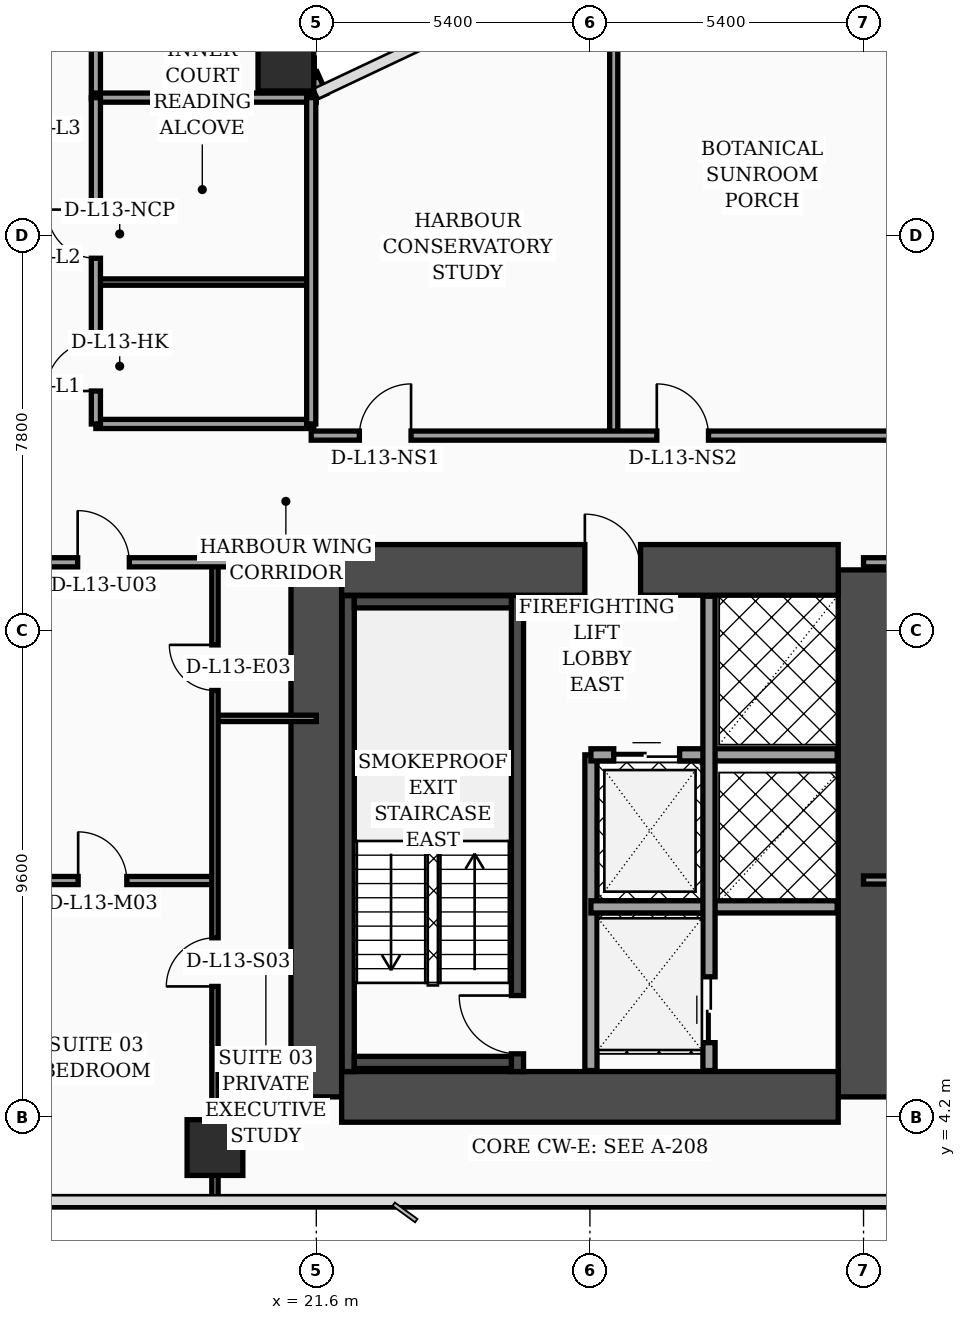
"""IFC4 building model, lengths in metres.
Left out: names, types, materials, properties, quantities, classifications, styles, units other than length and angle.
Written with IfcOpenShell. Run it as: python <this file> out.ifc"""

import sys

from ifc_helpers import new_model, si_unit, direction, frame, frame_2d, origin, origin_2d, place, context, subcontext, project, spatial, rectangle, hollow_rectangle, extrude, element, fill, save


model = new_model("IFC4")
c1 = context("Model", 3, precision=1e-05, world=origin(), true_north=direction((0.0, 1.0)))
c2 = subcontext(c1, "Body", "Model", "MODEL_VIEW")
j1 = project(units=[si_unit("LENGTHUNIT", "METRE"), si_unit("PLANEANGLEUNIT", "RADIAN")], contexts=[c1])
p1 = place(None, origin())
s1 = spatial("IfcSite", under=j1, at=p1, CompositionType="ELEMENT")
p2 = place(p1, origin())
s2 = spatial("IfcBuilding", under=s1, at=p2, CompositionType="ELEMENT")
p3 = place(p2, frame((0.0, 0.0, 58.4)))
s3 = spatial("IfcBuildingStorey", under=s2, at=p3, CompositionType="ELEMENT", Elevation=58.4)
for number, where, z_axis, x_axis in (
    (1, (21.6, 4.6, 0.0), (0.0, 0.0, 1.0), (0.0, 1.0, 0.0)),
    (2, (32.4, 4.6, 0.0), (0.0, 0.0, 1.0), (0.0, 1.0, 0.0)),
):
    element("IfcWall", number, at=place(p3, frame(where, z_axis=z_axis, x_axis=x_axis)), inside=s3, PredefinedType="SHEAR", context=c2, shape_type="SweptSolid", body=[
        extrude(rectangle(XDim=10.4, YDim=1.0, at=frame_2d((5.2, 0.0))), origin(), (0.0, 0.0, 1.0), 3.56),
    ])
p4 = place(p3, frame((22.1, 15.0, 0.0), z_axis=(0.0, 0.0, 1.0), x_axis=(1.0, 0.0, 0.0)))
e3 = element("IfcWall", 3, at=p4, inside=s3, PredefinedType="SHEAR", context=c2, shape_type="SweptSolid", body=[
    extrude(rectangle(XDim=9.8, YDim=1.0, at=frame_2d((4.9, 0.0))), origin(), (0.0, 0.0, 1.0), 3.56),
])
p5 = place(p4, frame((4.8, 0.0, 0.0)))
e4 = element("IfcOpeningElement", 4, at=p5, cuts=e3, PredefinedType="OPENING", context=c2, shape_type="SweptSolid", body=[
    extrude(rectangle(XDim=1.1, YDim=2.2, at=frame_2d((0.55, 1.1))), frame((0.0, 0.51, 0.0), z_axis=(0.0, -1.0, 0.0), x_axis=(1.0, 0.0, 0.0)), (0.0, 0.0, 1.0), 1.02),
])
p6 = place(p3, frame((22.1, 4.6, 0.0), z_axis=(0.0, 0.0, 1.0), x_axis=(1.0, 0.0, 0.0)))
e5 = element("IfcWall", 5, at=p6, inside=s3, PredefinedType="SHEAR", context=c2, shape_type="SweptSolid", body=[
    extrude(rectangle(XDim=9.8, YDim=1.0, at=frame_2d((4.9, 0.0))), origin(), (0.0, 0.0, 1.0), 3.56),
])
p7 = place(p3, frame((22.23, 5.1, 0.0), z_axis=(0.0, 0.0, 1.0), x_axis=(0.0, 1.0, 0.0)))
e6 = element("IfcWall", 6, at=p7, inside=s3, PredefinedType="SOLIDWALL", context=c2, shape_type="SweptSolid", body=[
    extrude(rectangle(XDim=9.39, YDim=0.24, at=frame_2d((4.695, 0.0))), origin(), (0.0, 0.0, 1.0), 3.56),
])
p8 = place(p3, frame((25.57, 5.1, 0.0), z_axis=(0.0, 0.0, 1.0), x_axis=(0.0, 1.0, 0.0)))
e7 = element("IfcWall", 7, at=p8, inside=s3, PredefinedType="SOLIDWALL", context=c2, shape_type="SweptSolid", body=[
    extrude(rectangle(XDim=9.39, YDim=0.24, at=frame_2d((4.695, 0.0))), origin(), (0.0, 0.0, 1.0), 3.56),
])
p9 = place(p8, frame((0.35, 0.0, 0.0)))
e8 = element("IfcOpeningElement", 8, at=p9, cuts=e7, PredefinedType="OPENING", context=c2, shape_type="SweptSolid", body=[
    extrude(rectangle(XDim=1.15, YDim=2.2, at=frame_2d((0.575, 1.1))), frame((0.0, 0.13, 0.0), z_axis=(0.0, -1.0, 0.0), x_axis=(1.0, 0.0, 0.0)), (0.0, 0.0, 1.0), 0.26),
])
for number, where, z_axis, x_axis in (
    (9, (22.35, 5.28, 0.0), (0.0, 0.0, 1.0), (1.0, 0.0, 0.0)),
    (10, (22.35, 14.37, 0.0), (0.0, 0.0, 1.0), (1.0, 0.0, 0.0)),
):
    element("IfcWall", number, at=place(p3, frame(where, z_axis=z_axis, x_axis=x_axis)), inside=s3, PredefinedType="SOLIDWALL", context=c2, shape_type="SweptSolid", body=[
        extrude(rectangle(XDim=3.1, YDim=0.24, at=frame_2d((1.55, 0.0))), origin(), (0.0, 0.0, 1.0), 3.56),
    ])
for number, where, z_axis, x_axis in (
    (11, (21.0, 25.0, 0.0), (0.0, 0.0, 1.0), (1.0, 0.0, 0.0)),
    (12, (19.6, 3.6, 0.0), (0.0, 0.0, 1.0), (1.0, 0.0, 0.0)),
):
    element("IfcColumn", number, at=place(p3, frame(where, z_axis=z_axis, x_axis=x_axis)), inside=s3, PredefinedType="COLUMN", context=c2, shape_type="SweptSolid", body=[
        extrude(hollow_rectangle(XDim=1.1, YDim=1.1, WallThickness=0.045, at=origin_2d()), origin(), (0.0, 0.0, 1.0), 3.56),
    ])
p10 = place(p3, frame((21.68, 24.34, 0.0), z_axis=(0.0, 0.0, 1.0), x_axis=(-0.40758134973, 0.913168901875, 0.0)))
e13 = element("IfcWall", 13, at=p10, inside=s3, PredefinedType="SOLIDWALL", context=c2, shape_type="SweptSolid", body=[
    extrude(rectangle(XDim=0.471, YDim=0.28, at=frame_2d((0.235, 0.0))), origin(), (0.0, 0.0, 1.0), 3.56),
])
p11 = place(p3, frame((27.02, 5.12, 0.0), z_axis=(0.0, 0.0, 1.0), x_axis=(0.0, 1.0, 0.0)))
e14 = element("IfcWall", 14, at=p11, inside=s3, PredefinedType="SOLIDWALL", context=c2, shape_type="SweptSolid", body=[
    extrude(rectangle(XDim=6.23, YDim=0.24, at=frame_2d((3.115, 0.0))), origin(), (0.0, 0.0, 1.0), 3.56),
])
p12 = place(p3, frame((27.02, 11.35, 0.0), z_axis=(0.0, 0.0, 1.0), x_axis=(1.0, 0.0, 0.0)))
e15 = element("IfcWall", 15, at=p12, inside=s3, PredefinedType="SOLIDWALL", context=c2, shape_type="SweptSolid", body=[
    extrude(rectangle(XDim=4.86, YDim=0.24, at=frame_2d((2.43, 0.0))), origin(), (0.0, 0.0, 1.0), 3.56),
])
p13 = place(p12, frame((0.45, 0.0, 0.0)))
e16 = element("IfcOpeningElement", 16, at=p13, cuts=e15, PredefinedType="OPENING", context=c2, shape_type="SweptSolid", body=[
    extrude(rectangle(XDim=1.3, YDim=2.35, at=frame_2d((0.65, 1.175))), frame((0.0, 0.13, 0.0), z_axis=(0.0, -1.0, 0.0), x_axis=(1.0, 0.0, 0.0)), (0.0, 0.0, 1.0), 0.26),
])
p14 = place(p3, frame((27.02, 8.35, 0.0), z_axis=(0.0, 0.0, 1.0), x_axis=(1.0, 0.0, 0.0)))
e17 = element("IfcWall", 17, at=p14, inside=s3, PredefinedType="SOLIDWALL", context=c2, shape_type="SweptSolid", body=[
    extrude(rectangle(XDim=4.86, YDim=0.24, at=frame_2d((2.43, 0.0))), origin(), (0.0, 0.0, 1.0), 3.56),
])
p15 = place(p3, frame((29.35, 5.12, 0.0), z_axis=(0.0, 0.0, 1.0), x_axis=(0.0, 1.0, 0.0)))
e18 = element("IfcWall", 18, at=p15, inside=s3, PredefinedType="SOLIDWALL", context=c2, shape_type="SweptSolid", body=[
    extrude(rectangle(XDim=9.36, YDim=0.24, at=frame_2d((4.68, 0.0))), origin(), (0.0, 0.0, 1.0), 3.56),
])
p16 = place(p15, frame((0.55, 0.0, 0.0)))
e19 = element("IfcOpeningElement", 19, at=p16, cuts=e18, PredefinedType="OPENING", context=c2, shape_type="SweptSolid", body=[
    extrude(rectangle(XDim=1.3, YDim=2.35, at=frame_2d((0.65, 1.175))), frame((0.0, 0.13, 0.0), z_axis=(0.0, -1.0, 0.0), x_axis=(1.0, 0.0, 0.0)), (0.0, 0.0, 1.0), 0.26),
])
p17 = place(p3, frame((19.6, 12.07, 0.0), z_axis=(0.0, 0.0, 1.0), x_axis=(1.0, 0.0, 0.0)))
e20 = element("IfcWall", 20, at=p17, inside=s3, PredefinedType="PARTITIONING", context=c2, shape_type="SweptSolid", body=[
    extrude(rectangle(XDim=2.0, YDim=0.125, at=frame_2d((1.0, 0.0))), origin(), (0.0, 0.0, 1.0), 3.56),
])
p18 = place(p3, frame((15.15, 8.87, 0.0), z_axis=(0.0, 0.0, 1.0), x_axis=(1.0, 0.0, 0.0)))
e21 = element("IfcWall", 21, at=p18, inside=s3, PredefinedType="PARTITIONING", context=c2, shape_type="SweptSolid", body=[
    extrude(rectangle(XDim=4.45, YDim=0.16, at=frame_2d((2.225, 0.0))), origin(), (0.0, 0.0, 1.0), 3.56),
])
p19 = place(p18, frame((1.75, 0.0, 0.0)))
e22 = element("IfcOpeningElement", 22, at=p19, cuts=e21, PredefinedType="OPENING", context=c2, shape_type="SweptSolid", body=[
    extrude(rectangle(XDim=0.96, YDim=2.2, at=frame_2d((0.48, 1.1))), frame((0.0, 0.09, 0.0), z_axis=(0.0, -1.0, 0.0), x_axis=(1.0, 0.0, 0.0)), (0.0, 0.0, 1.0), 0.18),
])
p20 = place(p3, frame((19.6, 2.44, 0.0), z_axis=(0.0, 0.0, 1.0), x_axis=(0.0, 1.0, 0.0)))
e23 = element("IfcWall", 23, at=p20, inside=s3, PredefinedType="PARTITIONING", context=c2, shape_type="SweptSolid", body=[
    extrude(rectangle(XDim=12.71, YDim=0.125, at=frame_2d((6.355, 0.0))), origin(), (0.0, 0.0, 1.0), 2.34),
])
p21 = place(p20, frame((4.34, 0.0, 0.0)))
e24 = element("IfcOpeningElement", 24, at=p21, cuts=e23, PredefinedType="OPENING", context=c2, shape_type="SweptSolid", body=[
    extrude(rectangle(XDim=0.96, YDim=2.2, at=frame_2d((0.48, 1.1))), frame((0.0, 0.073, 0.0), z_axis=(0.0, -1.0, 0.0), x_axis=(1.0, 0.0, 0.0)), (0.0, 0.0, 1.0), 0.145),
])
p22 = place(p20, frame((10.18, 0.0, 0.0)))
e25 = element("IfcOpeningElement", 25, at=p22, cuts=e23, PredefinedType="OPENING", context=c2, shape_type="SweptSolid", body=[
    extrude(rectangle(XDim=0.9, YDim=2.15, at=frame_2d((0.45, 1.075))), frame((0.0, 0.073, 0.0), z_axis=(0.0, -1.0, 0.0), x_axis=(1.0, 0.0, 0.0)), (0.0, 0.0, 1.0), 0.145),
])
p23 = place(p3, frame((15.15, 15.15, 0.0), z_axis=(0.0, 0.0, 1.0), x_axis=(1.0, 0.0, 0.0)))
e26 = element("IfcWall", 26, at=p23, inside=s3, PredefinedType="PARTITIONING", context=c2, shape_type="SweptSolid", body=[
    extrude(rectangle(XDim=6.45, YDim=0.18, at=frame_2d((3.225, 0.0))), origin(), (0.0, 0.0, 1.0), 2.34),
])
p24 = place(p23, frame((1.74, 0.0, 0.0)))
e27 = element("IfcOpeningElement", 27, at=p24, cuts=e26, PredefinedType="OPENING", context=c2, shape_type="SweptSolid", body=[
    extrude(rectangle(XDim=1.02, YDim=2.2, at=frame_2d((0.51, 1.1))), frame((0.0, 0.1, 0.0), z_axis=(0.0, -1.0, 0.0), x_axis=(1.0, 0.0, 0.0)), (0.0, 0.0, 1.0), 0.2),
])
p25 = place(p3, frame((17.25, 24.3, 0.0), z_axis=(0.0, 0.0, 1.0), x_axis=(0.0, 1.0, 0.0)))
e28 = element("IfcWall", 28, at=p25, inside=s3, PredefinedType="PARTITIONING", context=c2, shape_type="SweptSolid", body=[
    extrude(rectangle(XDim=16.4, YDim=0.18, at=frame_2d((8.2, 0.0))), origin(), (0.0, 0.0, 1.0), 2.84),
])
p26 = place(p3, frame((17.25, 17.88, 0.0), z_axis=(0.0, 0.0, 1.0), x_axis=(1.0, 0.0, 0.0)))
e29 = element("IfcWall", 29, at=p26, inside=s3, PredefinedType="PARTITIONING", context=c2, shape_type="SweptSolid", body=[
    extrude(rectangle(XDim=4.3, YDim=0.18, at=frame_2d((2.15, 0.0))), origin(), (0.0, 0.0, 1.0), 3.09),
])
p27 = place(p3, frame((17.25, 20.68, 0.0), z_axis=(0.0, 0.0, 1.0), x_axis=(1.0, 0.0, 0.0)))
e30 = element("IfcWall", 30, at=p27, inside=s3, PredefinedType="PARTITIONING", context=c2, shape_type="SweptSolid", body=[
    extrude(rectangle(XDim=4.3, YDim=0.125, at=frame_2d((2.15, 0.0))), origin(), (0.0, 0.0, 1.0), 3.56),
])
p28 = place(p3, frame((17.25, 24.32, 0.0), z_axis=(0.0, 0.0, 1.0), x_axis=(1.0, 0.0, 0.0)))
e31 = element("IfcWall", 31, at=p28, inside=s3, PredefinedType="PARTITIONING", context=c2, shape_type="SweptSolid", body=[
    extrude(rectangle(XDim=4.35, YDim=0.18, at=frame_2d((2.175, 0.0))), origin(), (0.0, 0.0, 1.0), 3.56),
])
p29 = place(p3, frame((21.5, 17.88, 0.0), z_axis=(0.0, 0.0, 1.0), x_axis=(0.0, 1.0, 0.0)))
e32 = element("IfcWall", 32, at=p29, inside=s3, PredefinedType="PARTITIONING", context=c2, shape_type="SweptSolid", body=[
    extrude(rectangle(XDim=6.44, YDim=0.18, at=frame_2d((3.22, 0.0))), origin(), (0.0, 0.0, 1.0), 3.09),
])
p30 = place(p3, frame((17.25, 17.88, 0.0), z_axis=(0.0, 0.0, 1.0), x_axis=(0.0, 1.0, 0.0)))
e33 = element("IfcWall", 33, at=p30, inside=s3, PredefinedType="PARTITIONING", context=c2, shape_type="SweptSolid", body=[
    extrude(rectangle(XDim=6.44, YDim=0.18, at=frame_2d((3.22, 0.0))), origin(), (0.0, 0.0, 1.0), 3.09),
])
p31 = place(p30, frame((0.65, 0.0, 0.0)))
e34 = element("IfcOpeningElement", 34, at=p31, cuts=e33, PredefinedType="OPENING", context=c2, shape_type="SweptSolid", body=[
    extrude(rectangle(XDim=0.98, YDim=2.15, at=frame_2d((0.49, 1.075))), frame((0.0, 0.1, 0.0), z_axis=(0.0, -1.0, 0.0), x_axis=(1.0, 0.0, 0.0)), (0.0, 0.0, 1.0), 0.2),
])
p32 = place(p30, frame((3.27, 0.0, 0.0)))
e35 = element("IfcOpeningElement", 35, at=p32, cuts=e33, PredefinedType="OPENING", context=c2, shape_type="SweptSolid", body=[
    extrude(rectangle(XDim=0.96, YDim=2.2, at=frame_2d((0.48, 1.1))), frame((0.0, 0.1, 0.0), z_axis=(0.0, -1.0, 0.0), x_axis=(1.0, 0.0, 0.0)), (0.0, 0.0, 1.0), 0.2),
])
p33 = place(p3, frame((32.4, 8.88, 0.0), z_axis=(0.0, 0.0, 1.0), x_axis=(1.0, 0.0, 0.0)))
e36 = element("IfcWall", 36, at=p33, inside=s3, PredefinedType="PARTITIONING", context=c2, shape_type="SweptSolid", body=[
    extrude(rectangle(XDim=7.02, YDim=0.16, at=frame_2d((3.51, 0.0))), origin(), (0.0, 0.0, 1.0), 2.84),
])
p34 = place(p33, frame((3.03, 0.0, 0.0)))
e37 = element("IfcOpeningElement", 37, at=p34, cuts=e36, PredefinedType="OPENING", context=c2, shape_type="SweptSolid", body=[
    extrude(rectangle(XDim=0.96, YDim=2.2, at=frame_2d((0.48, 1.1))), frame((0.0, 0.09, 0.0), z_axis=(0.0, -1.0, 0.0), x_axis=(1.0, 0.0, 0.0)), (0.0, 0.0, 1.0), 0.18),
])
p35 = place(p3, frame((32.4, 15.15, 0.0), z_axis=(0.0, 0.0, 1.0), x_axis=(1.0, 0.0, 0.0)))
e38 = element("IfcWall", 38, at=p35, inside=s3, PredefinedType="PARTITIONING", context=c2, shape_type="SweptSolid", body=[
    extrude(rectangle(XDim=9.15, YDim=0.18, at=frame_2d((4.575, 0.0))), origin(), (0.0, 0.0, 1.0), 2.84),
])
p36 = place(p35, frame((3.1, 0.0, 0.0)))
e39 = element("IfcOpeningElement", 39, at=p36, cuts=e38, PredefinedType="OPENING", context=c2, shape_type="SweptSolid", body=[
    extrude(rectangle(XDim=1.02, YDim=2.2, at=frame_2d((0.51, 1.1))), frame((0.0, 0.1, 0.0), z_axis=(0.0, -1.0, 0.0), x_axis=(1.0, 0.0, 0.0)), (0.0, 0.0, 1.0), 0.2),
])
p37 = place(p3, frame((27.47, 17.65, 0.0), z_axis=(0.0, 0.0, 1.0), x_axis=(0.0, 1.0, 0.0)))
e40 = element("IfcWall", 40, at=p37, inside=s3, PredefinedType="PARTITIONING", context=c2, shape_type="SweptSolid", body=[
    extrude(rectangle(XDim=9.6, YDim=0.16, at=frame_2d((4.8, 0.0))), origin(), (0.0, 0.0, 1.0), 2.84),
])
p38 = place(p3, frame((21.5, 17.65, 0.0), z_axis=(0.0, 0.0, 1.0), x_axis=(1.0, 0.0, 0.0)))
e41 = element("IfcWall", 41, at=p38, inside=s3, PredefinedType="PARTITIONING", context=c2, shape_type="SweptSolid", body=[
    extrude(rectangle(XDim=17.7, YDim=0.18, at=frame_2d((8.85, 0.0))), origin(), (0.0, 0.0, 1.0), 2.84),
])
p39 = place(p38, frame((0.95, 0.0, 0.0)))
e42 = element("IfcOpeningElement", 42, at=p39, cuts=e41, PredefinedType="OPENING", context=c2, shape_type="SweptSolid", body=[
    extrude(rectangle(XDim=1.02, YDim=2.2, at=frame_2d((0.51, 1.1))), frame((0.0, 0.1, 0.0), z_axis=(0.0, -1.0, 0.0), x_axis=(1.0, 0.0, 0.0)), (0.0, 0.0, 1.0), 0.2),
])
p40 = place(p38, frame((6.82, 0.0, 0.0)))
e43 = element("IfcOpeningElement", 43, at=p40, cuts=e41, PredefinedType="OPENING", context=c2, shape_type="SweptSolid", body=[
    extrude(rectangle(XDim=1.02, YDim=2.2, at=frame_2d((0.51, 1.1))), frame((0.0, 0.1, 0.0), z_axis=(0.0, -1.0, 0.0), x_axis=(1.0, 0.0, 0.0)), (0.0, 0.0, 1.0), 0.2),
])
p41 = place(p38, frame((12.68, 0.0, 0.0)))
e44 = element("IfcOpeningElement", 44, at=p41, cuts=e41, PredefinedType="OPENING", context=c2, shape_type="SweptSolid", body=[
    extrude(rectangle(XDim=1.02, YDim=2.2, at=frame_2d((0.51, 1.1))), frame((0.0, 0.1, 0.0), z_axis=(0.0, -1.0, 0.0), x_axis=(1.0, 0.0, 0.0)), (0.0, 0.0, 1.0), 0.2),
])
p42 = place(p13, origin())
e45 = element("IfcDoor", 45, at=p42, inside=s3, OperationType="DOUBLE_DOOR_SLIDING", PredefinedType="DOOR", context=c2, shape_type="SweptSolid", body=[
    extrude(rectangle(XDim=1.3, YDim=2.35, at=frame_2d((0.65, 1.175))), frame((0.0, 0.025, 0.0), z_axis=(0.0, -1.0, 0.0), x_axis=(1.0, 0.0, 0.0)), (0.0, 0.0, 1.0), 0.05),
])
fill(e16, e45)
p43 = place(p16, origin())
e46 = element("IfcDoor", 46, at=p43, inside=s3, OperationType="DOUBLE_DOOR_SLIDING", PredefinedType="DOOR", context=c2, shape_type="SweptSolid", body=[
    extrude(rectangle(XDim=1.3, YDim=2.35, at=frame_2d((0.65, 1.175))), frame((0.0, 0.025, 0.0), z_axis=(0.0, -1.0, 0.0), x_axis=(1.0, 0.0, 0.0)), (0.0, 0.0, 1.0), 0.05),
])
fill(e19, e46)
p44 = place(p19, origin())
e47 = element("IfcDoor", 47, at=p44, inside=s3, OperationType="SINGLE_SWING_LEFT", PredefinedType="DOOR", context=c2, shape_type="SweptSolid", body=[
    extrude(rectangle(XDim=0.96, YDim=2.2, at=frame_2d((0.48, 1.1))), frame((0.0, 0.025, 0.0), z_axis=(0.0, -1.0, 0.0), x_axis=(1.0, 0.0, 0.0)), (0.0, 0.0, 1.0), 0.05),
])
fill(e22, e47)
p45 = place(p21, origin())
e48 = element("IfcDoor", 48, at=p45, inside=s3, OperationType="SINGLE_SWING_LEFT", PredefinedType="DOOR", context=c2, shape_type="SweptSolid", body=[
    extrude(rectangle(XDim=0.96, YDim=2.2, at=frame_2d((0.48, 1.1))), frame((0.0, 0.025, 0.0), z_axis=(0.0, -1.0, 0.0), x_axis=(1.0, 0.0, 0.0)), (0.0, 0.0, 1.0), 0.05),
])
fill(e24, e48)
p46 = place(p22, origin())
e49 = element("IfcDoor", 49, at=p46, inside=s3, OperationType="SINGLE_SWING_RIGHT", PredefinedType="DOOR", context=c2, shape_type="SweptSolid", body=[
    extrude(rectangle(XDim=0.9, YDim=2.15, at=frame_2d((0.45, 1.075))), frame((0.0, 0.025, 0.0), z_axis=(0.0, -1.0, 0.0), x_axis=(1.0, 0.0, 0.0)), (0.0, 0.0, 1.0), 0.05),
])
fill(e25, e49)
p47 = place(p24, origin())
e50 = element("IfcDoor", 50, at=p47, inside=s3, OperationType="SINGLE_SWING_LEFT", PredefinedType="DOOR", context=c2, shape_type="SweptSolid", body=[
    extrude(rectangle(XDim=1.02, YDim=2.2, at=frame_2d((0.51, 1.1))), frame((0.0, 0.025, 0.0), z_axis=(0.0, -1.0, 0.0), x_axis=(1.0, 0.0, 0.0)), (0.0, 0.0, 1.0), 0.05),
])
fill(e27, e50)
p48 = place(p31, origin())
e51 = element("IfcDoor", 51, at=p48, inside=s3, OperationType="SINGLE_SWING_LEFT", PredefinedType="DOOR", context=c2, shape_type="SweptSolid", body=[
    extrude(rectangle(XDim=0.98, YDim=2.15, at=frame_2d((0.49, 1.075))), frame((0.0, 0.025, 0.0), z_axis=(0.0, -1.0, 0.0), x_axis=(1.0, 0.0, 0.0)), (0.0, 0.0, 1.0), 0.05),
])
fill(e34, e51)
p49 = place(p32, origin())
e52 = element("IfcDoor", 52, at=p49, inside=s3, OperationType="SINGLE_SWING_RIGHT", PredefinedType="DOOR", context=c2, shape_type="SweptSolid", body=[
    extrude(rectangle(XDim=0.96, YDim=2.2, at=frame_2d((0.48, 1.1))), frame((0.0, 0.025, 0.0), z_axis=(0.0, -1.0, 0.0), x_axis=(1.0, 0.0, 0.0)), (0.0, 0.0, 1.0), 0.05),
])
fill(e35, e52)
p50 = place(p39, origin())
e53 = element("IfcDoor", 53, at=p50, inside=s3, OperationType="SINGLE_SWING_RIGHT", PredefinedType="DOOR", context=c2, shape_type="SweptSolid", body=[
    extrude(rectangle(XDim=1.02, YDim=2.2, at=frame_2d((0.51, 1.1))), frame((0.0, 0.025, 0.0), z_axis=(0.0, -1.0, 0.0), x_axis=(1.0, 0.0, 0.0)), (0.0, 0.0, 1.0), 0.05),
])
fill(e42, e53)
p51 = place(p40, origin())
e54 = element("IfcDoor", 54, at=p51, inside=s3, OperationType="SINGLE_SWING_LEFT", PredefinedType="DOOR", context=c2, shape_type="SweptSolid", body=[
    extrude(rectangle(XDim=1.02, YDim=2.2, at=frame_2d((0.51, 1.1))), frame((0.0, 0.025, 0.0), z_axis=(0.0, -1.0, 0.0), x_axis=(1.0, 0.0, 0.0)), (0.0, 0.0, 1.0), 0.05),
])
fill(e43, e54)
p52 = place(p9, origin())
e55 = element("IfcDoor", 55, at=p52, inside=s3, OperationType="SINGLE_SWING_RIGHT", PredefinedType="DOOR", context=c2, shape_type="SweptSolid", body=[
    extrude(rectangle(XDim=1.15, YDim=2.2, at=frame_2d((0.575, 1.1))), frame((0.0, 0.025, 0.0), z_axis=(0.0, -1.0, 0.0), x_axis=(1.0, 0.0, 0.0)), (0.0, 0.0, 1.0), 0.05),
])
fill(e8, e55)
p53 = place(p5, origin())
e56 = element("IfcDoor", 56, at=p53, inside=s3, OperationType="SINGLE_SWING_LEFT", PredefinedType="DOOR", context=c2, shape_type="SweptSolid", body=[
    extrude(rectangle(XDim=1.1, YDim=2.2, at=frame_2d((0.55, 1.1))), frame((0.0, 0.025, 0.0), z_axis=(0.0, -1.0, 0.0), x_axis=(1.0, 0.0, 0.0)), (0.0, 0.0, 1.0), 0.05),
])
fill(e4, e56)
save(model, sys.argv[1])
